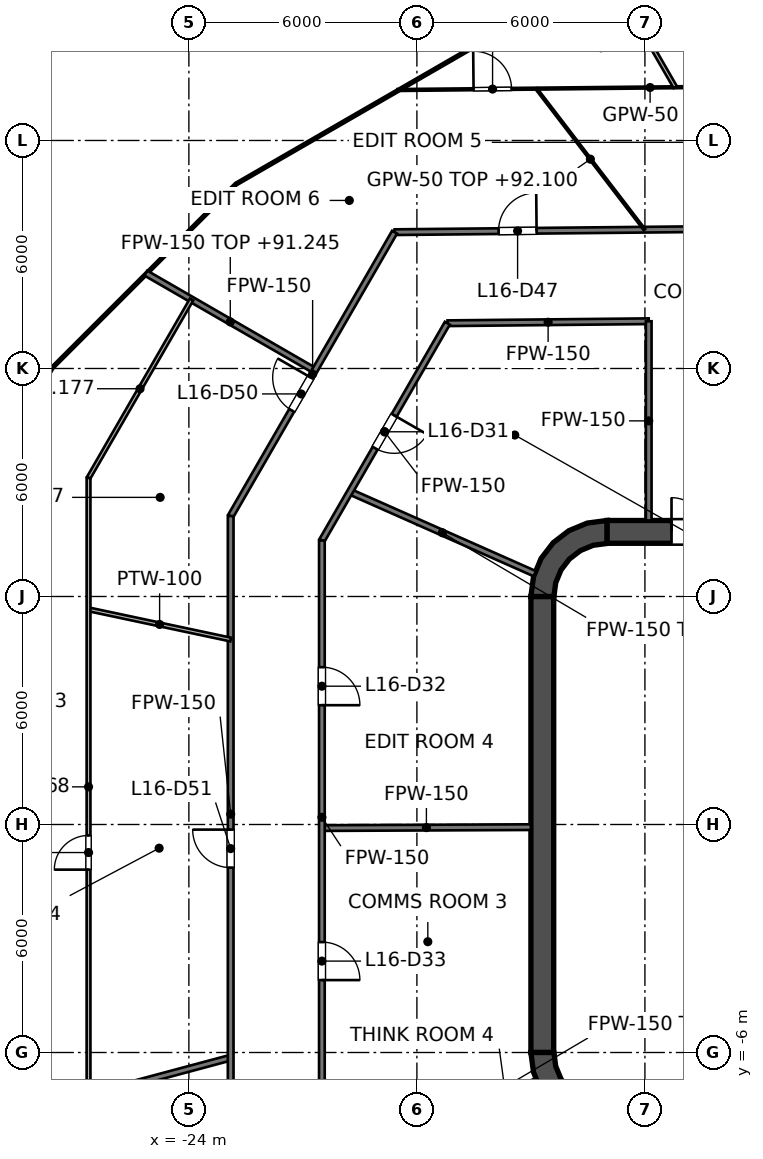
"""IFC4 building model, lengths in metres.
Left out: names, types, materials, properties, quantities, classifications, styles, units other than length and angle.
Written with IfcOpenShell. Run it as: python <this file> out.ifc"""

import sys

from ifc_helpers import new_model, si_unit, direction, frame, frame_2d, origin, place, context, subcontext, project, spatial, polyline, rectangle, outline, extrude, element, fill, save


model = new_model("IFC4")
c1 = context("Model", 3, precision=1e-05, world=origin(), true_north=direction((0.0, 1.0)))
c2 = subcontext(c1, "Body", "Model", "MODEL_VIEW")
j1 = project(units=[si_unit("LENGTHUNIT", "METRE"), si_unit("PLANEANGLEUNIT", "RADIAN")], contexts=[c1])
p1 = place(None, origin())
s1 = spatial("IfcSite", under=j1, at=p1, CompositionType="ELEMENT")
p2 = place(p1, origin())
s2 = spatial("IfcBuilding", under=s1, at=p2, CompositionType="ELEMENT")
p3 = place(p2, frame((0.0, 0.0, 88.2)))
s3 = spatial("IfcBuildingStorey", under=s2, at=p3, CompositionType="ELEMENT", Elevation=88.2)
p4 = place(p3, frame((-13.0, 7.7, 0.0), z_axis=(0.0, 0.0, 1.0), x_axis=(1.0, 0.0, 0.0)))
e1 = element("IfcWall", 1, at=p4, inside=s3, PredefinedType="SHEAR", context=c2, shape_type="SweptSolid", body=[
    extrude(rectangle(XDim=26.0, YDim=0.6, at=frame_2d((13.0, 0.0))), origin(), (0.0, 0.0, 1.0), 4.2),
])
p5 = place(p4, frame((1.7, 0.0, 0.0)))
e2 = element("IfcOpeningElement", 2, at=p5, cuts=e1, PredefinedType="OPENING", context=c2, shape_type="SweptSolid", body=[
    extrude(rectangle(XDim=1.8, YDim=2.1, at=frame_2d((0.9, 1.05))), frame((0.0, 0.3, 0.0), z_axis=(0.0, -1.0, 0.0), x_axis=(1.0, 0.0, 0.0)), (0.0, 0.0, 1.0), 0.6),
])
p6 = place(p4, frame((22.5, 0.0, 0.0)))
e3 = element("IfcOpeningElement", 3, at=p6, cuts=e1, PredefinedType="OPENING", context=c2, shape_type="SweptSolid", body=[
    extrude(rectangle(XDim=1.8, YDim=2.1, at=frame_2d((0.9, 1.05))), frame((0.0, 0.3, 0.0), z_axis=(0.0, -1.0, 0.0), x_axis=(1.0, 0.0, 0.0)), (0.0, 0.0, 1.0), 0.6),
])
p7 = place(p3, frame((-14.7, -6.0, 0.0), z_axis=(0.0, 0.0, 1.0), x_axis=(0.0, 1.0, 0.0)))
e4 = element("IfcWall", 4, at=p7, inside=s3, PredefinedType="SHEAR", context=c2, shape_type="SweptSolid", body=[
    extrude(rectangle(XDim=12.0, YDim=0.6, at=frame_2d((6.0, 0.0))), origin(), (0.0, 0.0, 1.0), 4.2),
])
p8 = place(p3, origin())
e5 = element("IfcWall", 5, at=p8, inside=s3, PredefinedType="SHEAR", context=c2, shape_type="SweptSolid", body=[
    extrude(outline(polyline([(-15.0, 6.0), (-14.395, 6.0), (-14.347, 6.361), (-14.208, 6.698), (-13.986, 6.986), (-13.698, 7.208), (-13.361, 7.347), (-13.0, 7.395), (-13.0, 8.0), (-13.518, 7.932), (-14.0, 7.732), (-14.414, 7.414), (-14.732, 7.0), (-14.932, 6.518), (-15.0, 6.0)])), origin(), (0.0, 0.0, 1.0), 4.2),
])
e6 = element("IfcWall", 6, at=p8, inside=s3, PredefinedType="SHEAR", context=c2, shape_type="SweptSolid", body=[
    extrude(outline(polyline([(-13.0, -8.0), (-13.0, -7.395), (-13.361, -7.347), (-13.698, -7.208), (-13.986, -6.986), (-14.208, -6.698), (-14.347, -6.361), (-14.395, -6.0), (-15.0, -6.0), (-14.932, -6.518), (-14.732, -7.0), (-14.414, -7.414), (-14.0, -7.732), (-13.518, -7.932), (-13.0, -8.0)])), origin(), (0.0, 0.0, 1.0), 4.2),
])
p9 = place(p3, frame((-11.8, -7.4, 0.0), z_axis=(0.0, 0.0, 1.0), x_axis=(0.0, 1.0, 0.0)))
e7 = element("IfcWall", 7, at=p9, inside=s3, PredefinedType="SOLIDWALL", context=c2, shape_type="SweptSolid", body=[
    extrude(rectangle(XDim=14.8, YDim=0.4, at=frame_2d((7.4, 0.0))), origin(), (0.0, 0.0, 1.0), 4.05),
])
p10 = place(p9, frame((11.2, 0.0, 0.0)))
e8 = element("IfcOpeningElement", 8, at=p10, cuts=e7, PredefinedType="OPENING", context=c2, shape_type="SweptSolid", body=[
    extrude(rectangle(XDim=1.1, YDim=2.1, at=frame_2d((0.55, 1.05))), frame((0.0, 0.2, 0.0), z_axis=(0.0, -1.0, 0.0), x_axis=(1.0, 0.0, 0.0)), (0.0, 0.0, 1.0), 0.4),
])
p11 = place(p9, frame((8.3, 0.0, 0.0)))
e9 = element("IfcOpeningElement", 9, at=p11, cuts=e7, PredefinedType="OPENING", context=c2, shape_type="SweptSolid", body=[
    extrude(rectangle(XDim=1.1, YDim=2.1, at=frame_2d((0.55, 1.05))), frame((0.0, 0.2, 0.0), z_axis=(0.0, -1.0, 0.0), x_axis=(1.0, 0.0, 0.0)), (0.0, 0.0, 1.0), 0.4),
])
p12 = place(p9, frame((5.4, 0.0, 0.0)))
e10 = element("IfcOpeningElement", 10, at=p12, cuts=e7, PredefinedType="OPENING", context=c2, shape_type="SweptSolid", body=[
    extrude(rectangle(XDim=1.1, YDim=2.1, at=frame_2d((0.55, 1.05))), frame((0.0, 0.2, 0.0), z_axis=(0.0, -1.0, 0.0), x_axis=(1.0, 0.0, 0.0)), (0.0, 0.0, 1.0), 0.4),
])
p13 = place(p9, frame((13.552, 0.0, 0.0)))
e11 = element("IfcOpeningElement", 11, at=p13, cuts=e7, PredefinedType="OPENING", context=c2, shape_type="SweptSolid", body=[
    extrude(rectangle(XDim=0.9, YDim=2.1, at=frame_2d((0.45, 1.05))), frame((0.0, 0.2, 0.0), z_axis=(0.0, -1.0, 0.0), x_axis=(1.0, 0.0, 0.0)), (0.0, 0.0, 1.0), 0.4),
])
p14 = place(p9, frame((0.347, 0.0, 0.0)))
e12 = element("IfcOpeningElement", 12, at=p14, cuts=e7, PredefinedType="OPENING", context=c2, shape_type="SweptSolid", body=[
    extrude(rectangle(XDim=0.9, YDim=2.1, at=frame_2d((0.45, 1.05))), frame((0.0, 0.2, 0.0), z_axis=(0.0, -1.0, 0.0), x_axis=(1.0, 0.0, 0.0)), (0.0, 0.0, 1.0), 0.4),
])
e13 = element("IfcWall", 13, at=p8, inside=s3, PredefinedType="SOLIDWALL", context=c2, shape_type="SweptSolid", body=[
    extrude(outline(polyline([(-12.0, -5.925), (-12.0, -5.675), (-14.15, -5.675), (-14.15, -3.025), (-12.0, -3.025), (-12.0, -2.775), (-14.15, -2.775), (-14.15, -0.125), (-12.0, -0.125), (-12.0, 0.125), (-14.15, 0.125), (-14.15, 2.775), (-12.0, 2.775), (-12.0, 3.025), (-14.15, 3.025), (-14.15, 5.675), (-12.0, 5.675), (-12.0, 5.925), (-14.15, 5.925), (-14.4, 5.925), (-14.4, 5.675), (-14.4, 3.025), (-14.4, 2.775), (-14.4, 0.125), (-14.4, -0.125), (-14.4, -2.775), (-14.4, -3.025), (-14.4, -5.675), (-14.4, -5.925), (-14.15, -5.925), (-12.0, -5.925)])), origin(), (0.0, 0.0, 1.0), 4.05),
])
p15 = place(p3, frame((-25.131, 14.509, 0.0), z_axis=(0.0, 0.0, 1.0), x_axis=(0.866037334331, -0.499979335118, 0.0)))
e14 = element("IfcWall", 14, at=p15, inside=s3, PredefinedType="PARTITIONING", context=c2, shape_type="SweptSolid", body=[
    extrude(rectangle(XDim=5.128, YDim=0.15, at=frame_2d((2.564, 0.0))), origin(), (0.0, 0.0, 1.0), 3.045),
])
p16 = place(p3, frame((-19.76, 8.755, 0.0), z_axis=(0.0, 0.0, 1.0), x_axis=(0.91424834547, -0.405154245695, 0.0)))
e15 = element("IfcWall", 15, at=p16, inside=s3, PredefinedType="PARTITIONING", context=c2, shape_type="SweptSolid", body=[
    extrude(rectangle(XDim=5.318, YDim=0.15, at=frame_2d((2.659, 0.0))), origin(), (0.0, 0.0, 1.0), 2.977),
])
p17 = place(p3, frame((-20.5, -0.094, 0.0), z_axis=(0.0, 0.0, 1.0), x_axis=(0.999990148138, 0.004438876723, 0.0)))
e16 = element("IfcWall", 16, at=p17, inside=s3, PredefinedType="PARTITIONING", context=c2, shape_type="SweptSolid", body=[
    extrude(rectangle(XDim=5.5, YDim=0.15, at=frame_2d((2.75, 0.0))), origin(), (0.0, 0.0, 1.0), 2.968),
])
p18 = place(p3, frame((-17.194, 13.191, 0.0), z_axis=(0.0, 0.0, 1.0), x_axis=(0.999950853109, 0.009914200296, 0.0)))
e17 = element("IfcWall", 17, at=p18, inside=s3, PredefinedType="PARTITIONING", context=c2, shape_type="SweptSolid", body=[
    extrude(rectangle(XDim=5.294, YDim=0.15, at=frame_2d((2.647, 0.0))), origin(), (0.0, 0.0, 1.0), 2.968),
])
p19 = place(p3, frame((-18.587, 15.587, 0.0), z_axis=(0.0, 0.0, 1.0), x_axis=(0.99995087003, 0.009912493396, 0.0)))
e18 = element("IfcWall", 18, at=p19, inside=s3, PredefinedType="PARTITIONING", context=c2, shape_type="SweptSolid", body=[
    extrude(rectangle(XDim=33.669, YDim=0.15, at=frame_2d((16.834, 0.0))), origin(), (0.0, 0.0, 1.0), 2.968),
])
p20 = place(p19, frame((21.034, 0.0, 0.0)))
e19 = element("IfcOpeningElement", 19, at=p20, cuts=e18, PredefinedType="OPENING", context=c2, shape_type="SweptSolid", body=[
    extrude(rectangle(XDim=1.0, YDim=2.1, at=frame_2d((0.5, 1.05))), frame((0.0, 0.075, 0.0), z_axis=(0.0, -1.0, 0.0), x_axis=(1.0, 0.0, 0.0)), (0.0, 0.0, 1.0), 0.15),
])
p21 = place(p19, frame((17.73, 0.0, 0.0)))
e20 = element("IfcOpeningElement", 20, at=p21, cuts=e18, PredefinedType="OPENING", context=c2, shape_type="SweptSolid", body=[
    extrude(rectangle(XDim=1.0, YDim=2.1, at=frame_2d((0.5, 1.05))), frame((0.0, 0.075, 0.0), z_axis=(0.0, -1.0, 0.0), x_axis=(1.0, 0.0, 0.0)), (0.0, 0.0, 1.0), 0.15),
])
p22 = place(p19, frame((15.077, 0.0, 0.0)))
e21 = element("IfcOpeningElement", 21, at=p22, cuts=e18, PredefinedType="OPENING", context=c2, shape_type="SweptSolid", body=[
    extrude(rectangle(XDim=1.0, YDim=2.1, at=frame_2d((0.5, 1.05))), frame((0.0, 0.075, 0.0), z_axis=(0.0, -1.0, 0.0), x_axis=(1.0, 0.0, 0.0)), (0.0, 0.0, 1.0), 0.15),
])
p23 = place(p19, frame((10.026, 0.0, 0.0)))
e22 = element("IfcOpeningElement", 22, at=p23, cuts=e18, PredefinedType="OPENING", context=c2, shape_type="SweptSolid", body=[
    extrude(rectangle(XDim=1.0, YDim=2.1, at=frame_2d((0.5, 1.05))), frame((0.0, 0.075, 0.0), z_axis=(0.0, -1.0, 0.0), x_axis=(1.0, 0.0, 0.0)), (0.0, 0.0, 1.0), 0.15),
])
p24 = place(p19, frame((2.737, 0.0, 0.0)))
e23 = element("IfcOpeningElement", 23, at=p24, cuts=e18, PredefinedType="OPENING", context=c2, shape_type="SweptSolid", body=[
    extrude(rectangle(XDim=1.0, YDim=2.1, at=frame_2d((0.5, 1.05))), frame((0.0, 0.075, 0.0), z_axis=(0.0, -1.0, 0.0), x_axis=(1.0, 0.0, 0.0)), (0.0, 0.0, 1.0), 0.15),
])
p25 = place(p3, frame((-29.928, -8.019, 0.0), z_axis=(0.0, 0.0, 1.0), x_axis=(0.965929629594, 0.258804850559, 0.0)))
e24 = element("IfcWall", 24, at=p25, inside=s3, PredefinedType="PARTITIONING", context=c2, shape_type="SweptSolid", body=[
    extrude(rectangle(XDim=7.276, YDim=0.15, at=frame_2d((3.638, 0.0))), origin(), (0.0, 0.0, 1.0), 3.727),
])
p26 = place(p3, frame((-19.728, -8.958, 0.0), z_axis=(0.0, 0.0, 1.0), x_axis=(0.910629511797, 0.413223779863, 0.0)))
e25 = element("IfcWall", 25, at=p26, inside=s3, PredefinedType="PARTITIONING", context=c2, shape_type="SweptSolid", body=[
    extrude(rectangle(XDim=5.368, YDim=0.15, at=frame_2d((2.684, 0.0))), origin(), (0.0, 0.0, 1.0), 3.9),
])
p27 = place(p3, frame((-20.5, 7.474, 0.0), z_axis=(0.0, 0.0, 1.0), x_axis=(0.500012665616, 0.866018091164, 0.0)))
e26 = element("IfcWall", 26, at=p27, inside=s3, PredefinedType="PARTITIONING", context=c2, shape_type="SweptSolid", body=[
    extrude(rectangle(XDim=6.602, YDim=0.15, at=frame_2d((3.301, 0.0))), origin(), (0.0, 0.0, 1.0), 2.968),
])
p28 = place(p27, frame((2.803, 0.0, 0.0)))
e27 = element("IfcOpeningElement", 27, at=p28, cuts=e26, PredefinedType="OPENING", context=c2, shape_type="SweptSolid", body=[
    extrude(rectangle(XDim=1.0, YDim=2.1, at=frame_2d((0.5, 1.05))), frame((0.0, 0.075, 0.0), z_axis=(0.0, -1.0, 0.0), x_axis=(1.0, 0.0, 0.0)), (0.0, 0.0, 1.0), 0.15),
])
p29 = place(p3, frame((-22.9, 8.117, 0.0), z_axis=(0.0, 0.0, 1.0), x_axis=(0.5000050195, 0.866022505755, 0.0)))
e28 = element("IfcWall", 28, at=p29, inside=s3, PredefinedType="PARTITIONING", context=c2, shape_type="SweptSolid", body=[
    extrude(rectangle(XDim=8.626, YDim=0.15, at=frame_2d((4.313, 0.0))), origin(), (0.0, 0.0, 1.0), 2.968),
])
p30 = place(p29, frame((3.211, 0.0, 0.0)))
e29 = element("IfcOpeningElement", 29, at=p30, cuts=e28, PredefinedType="OPENING", context=c2, shape_type="SweptSolid", body=[
    extrude(rectangle(XDim=1.0, YDim=2.1, at=frame_2d((0.5, 1.05))), frame((0.0, 0.075, 0.0), z_axis=(0.0, -1.0, 0.0), x_axis=(1.0, 0.0, 0.0)), (0.0, 0.0, 1.0), 0.15),
])
p31 = place(p3, frame((-11.9, 8.0, 0.0), z_axis=(0.0, 0.0, 1.0), x_axis=(0.0, 1.0, 0.0)))
e30 = element("IfcWall", 30, at=p31, inside=s3, PredefinedType="PARTITIONING", context=c2, shape_type="SweptSolid", body=[
    extrude(rectangle(XDim=5.243, YDim=0.15, at=frame_2d((2.622, 0.0))), origin(), (0.0, 0.0, 1.0), 2.968),
])
p32 = place(p3, frame((-20.5, -7.095, 0.0), z_axis=(0.0, 0.0, 1.0), x_axis=(0.0, 1.0, 0.0)))
e31 = element("IfcWall", 31, at=p32, inside=s3, PredefinedType="PARTITIONING", context=c2, shape_type="SweptSolid", body=[
    extrude(rectangle(XDim=14.569, YDim=0.15, at=frame_2d((7.285, 0.0))), origin(), (0.0, 0.0, 1.0), 2.968),
])
p33 = place(p32, frame((10.234, 0.0, 0.0)))
e32 = element("IfcOpeningElement", 32, at=p33, cuts=e31, PredefinedType="OPENING", context=c2, shape_type="SweptSolid", body=[
    extrude(rectangle(XDim=1.0, YDim=2.1, at=frame_2d((0.5, 1.05))), frame((0.0, 0.075, 0.0), z_axis=(0.0, -1.0, 0.0), x_axis=(1.0, 0.0, 0.0)), (0.0, 0.0, 1.0), 0.15),
])
p34 = place(p32, frame((3.0, 0.0, 0.0)))
e33 = element("IfcOpeningElement", 33, at=p34, cuts=e31, PredefinedType="OPENING", context=c2, shape_type="SweptSolid", body=[
    extrude(rectangle(XDim=1.0, YDim=2.1, at=frame_2d((0.5, 1.05))), frame((0.0, 0.075, 0.0), z_axis=(0.0, -1.0, 0.0), x_axis=(1.0, 0.0, 0.0)), (0.0, 0.0, 1.0), 0.15),
])
p35 = place(p3, frame((-22.9, -7.572, 0.0), z_axis=(0.0, 0.0, 1.0), x_axis=(0.0, 1.0, 0.0)))
e34 = element("IfcWall", 34, at=p35, inside=s3, PredefinedType="PARTITIONING", context=c2, shape_type="SweptSolid", body=[
    extrude(rectangle(XDim=15.689, YDim=0.15, at=frame_2d((7.844, 0.0))), origin(), (0.0, 0.0, 1.0), 2.968),
])
p36 = place(p35, frame((6.438, 0.0, 0.0)))
e35 = element("IfcOpeningElement", 35, at=p36, cuts=e34, PredefinedType="OPENING", context=c2, shape_type="SweptSolid", body=[
    extrude(rectangle(XDim=1.0, YDim=2.1, at=frame_2d((0.5, 1.05))), frame((0.0, 0.075, 0.0), z_axis=(0.0, -1.0, 0.0), x_axis=(1.0, 0.0, 0.0)), (0.0, 0.0, 1.0), 0.15),
])
p37 = place(p3, frame((-14.859, 19.364, 0.0), z_axis=(0.0, 0.0, 1.0), x_axis=(0.608714147517, -0.793389618418, 0.0)))
e36 = element("IfcWall", 36, at=p37, inside=s3, PredefinedType="PARTITIONING", context=c2, shape_type="SweptSolid", body=[
    extrude(rectangle(XDim=4.678, YDim=0.05, at=frame_2d((2.339, 0.0))), origin(), (0.0, 0.0, 1.0), 3.9),
])
p38 = place(p3, frame((-18.512, 19.328, 0.0), z_axis=(0.0, 0.0, 1.0), x_axis=(0.999950851933, 0.009914318817, 0.0)))
e37 = element("IfcWall", 37, at=p38, inside=s3, PredefinedType="PARTITIONING", context=c2, shape_type="SweptSolid", body=[
    extrude(rectangle(XDim=13.298, YDim=0.05, at=frame_2d((6.649, 0.0))), origin(), (0.0, 0.0, 1.0), 2.968),
])
p39 = place(p38, frame((7.975, 0.0, 0.0)))
e38 = element("IfcOpeningElement", 38, at=p39, cuts=e37, PredefinedType="OPENING", context=c2, shape_type="SweptSolid", body=[
    extrude(rectangle(XDim=1.0, YDim=2.1, at=frame_2d((0.5, 1.05))), frame((0.0, 0.025, 0.0), z_axis=(0.0, -1.0, 0.0), x_axis=(1.0, 0.0, 0.0)), (0.0, 0.0, 1.0), 0.05),
])
p40 = place(p38, frame((2.003, 0.0, 0.0)))
e39 = element("IfcOpeningElement", 39, at=p40, cuts=e37, PredefinedType="OPENING", context=c2, shape_type="SweptSolid", body=[
    extrude(rectangle(XDim=1.0, YDim=2.1, at=frame_2d((0.5, 1.05))), frame((0.0, 0.025, 0.0), z_axis=(0.0, -1.0, 0.0), x_axis=(1.0, 0.0, 0.0)), (0.0, 0.0, 1.0), 0.05),
])
p41 = place(p3, frame((-12.629, 21.874, 0.0), z_axis=(0.0, 0.0, 1.0), x_axis=(0.500028324968, -0.866009049739, 0.0)))
e40 = element("IfcWall", 40, at=p41, inside=s3, PredefinedType="PARTITIONING", context=c2, shape_type="SweptSolid", body=[
    extrude(rectangle(XDim=2.856, YDim=0.1, at=frame_2d((1.428, 0.0))), origin(), (0.0, 0.0, 1.0), 3.502),
])
p42 = place(p3, frame((-26.64, 5.662, 0.0), z_axis=(0.0, 0.0, 1.0), x_axis=(0.978136613381, -0.207963375533, 0.0)))
e41 = element("IfcWall", 41, at=p42, inside=s3, PredefinedType="PARTITIONING", context=c2, shape_type="SweptSolid", body=[
    extrude(rectangle(XDim=3.823, YDim=0.1, at=frame_2d((1.912, 0.0))), origin(), (0.0, 0.0, 1.0), 3.9),
])
p43 = place(p3, frame((-26.64, 9.119, 0.0), z_axis=(0.0, 0.0, 1.0), x_axis=(0.499955005135, 0.866051380023, 0.0)))
e42 = element("IfcWall", 42, at=p43, inside=s3, PredefinedType="PARTITIONING", context=c2, shape_type="SweptSolid", body=[
    extrude(rectangle(XDim=5.422, YDim=0.1, at=frame_2d((2.711, 0.0))), origin(), (0.0, 0.0, 1.0), 2.977),
])
p44 = place(p3, frame((-26.64, -7.138, 0.0), z_axis=(0.0, 0.0, 1.0), x_axis=(0.0, 1.0, 0.0)))
e43 = element("IfcWall", 43, at=p44, inside=s3, PredefinedType="PARTITIONING", context=c2, shape_type="SweptSolid", body=[
    extrude(rectangle(XDim=16.257, YDim=0.1, at=frame_2d((8.128, 0.0))), origin(), (0.0, 0.0, 1.0), 2.968),
])
p45 = place(p44, frame((5.95, 0.0, 0.0)))
e44 = element("IfcOpeningElement", 44, at=p45, cuts=e43, PredefinedType="OPENING", context=c2, shape_type="SweptSolid", body=[
    extrude(rectangle(XDim=0.9, YDim=2.1, at=frame_2d((0.45, 1.05))), frame((0.0, 0.05, 0.0), z_axis=(0.0, -1.0, 0.0), x_axis=(1.0, 0.0, 0.0)), (0.0, 0.0, 1.0), 0.1),
])
p46 = place(p10, origin())
e45 = element("IfcDoor", 45, at=p46, inside=s3, OperationType="DOUBLE_DOOR_SLIDING", PredefinedType="DOOR", context=c2, shape_type="SweptSolid", body=[
    extrude(rectangle(XDim=1.1, YDim=2.1, at=frame_2d((0.55, 1.05))), frame((0.0, 0.025, 0.0), z_axis=(0.0, -1.0, 0.0), x_axis=(1.0, 0.0, 0.0)), (0.0, 0.0, 1.0), 0.05),
])
fill(e8, e45)
p47 = place(p11, origin())
e46 = element("IfcDoor", 46, at=p47, inside=s3, OperationType="DOUBLE_DOOR_SLIDING", PredefinedType="DOOR", context=c2, shape_type="SweptSolid", body=[
    extrude(rectangle(XDim=1.1, YDim=2.1, at=frame_2d((0.55, 1.05))), frame((0.0, 0.025, 0.0), z_axis=(0.0, -1.0, 0.0), x_axis=(1.0, 0.0, 0.0)), (0.0, 0.0, 1.0), 0.05),
])
fill(e9, e46)
p48 = place(p12, origin())
e47 = element("IfcDoor", 47, at=p48, inside=s3, OperationType="DOUBLE_DOOR_SLIDING", PredefinedType="DOOR", context=c2, shape_type="SweptSolid", body=[
    extrude(rectangle(XDim=1.1, YDim=2.1, at=frame_2d((0.55, 1.05))), frame((0.0, 0.025, 0.0), z_axis=(0.0, -1.0, 0.0), x_axis=(1.0, 0.0, 0.0)), (0.0, 0.0, 1.0), 0.05),
])
fill(e10, e47)
p49 = place(p13, origin())
e48 = element("IfcDoor", 48, at=p49, inside=s3, OperationType="SINGLE_SWING_LEFT", PredefinedType="DOOR", context=c2, shape_type="SweptSolid", body=[
    extrude(rectangle(XDim=0.9, YDim=2.1, at=frame_2d((0.45, 1.05))), frame((0.0, 0.025, 0.0), z_axis=(0.0, -1.0, 0.0), x_axis=(1.0, 0.0, 0.0)), (0.0, 0.0, 1.0), 0.05),
])
fill(e11, e48)
p50 = place(p14, origin())
e49 = element("IfcDoor", 49, at=p50, inside=s3, OperationType="SINGLE_SWING_LEFT", PredefinedType="DOOR", context=c2, shape_type="SweptSolid", body=[
    extrude(rectangle(XDim=0.9, YDim=2.1, at=frame_2d((0.45, 1.05))), frame((0.0, 0.025, 0.0), z_axis=(0.0, -1.0, 0.0), x_axis=(1.0, 0.0, 0.0)), (0.0, 0.0, 1.0), 0.05),
])
fill(e12, e49)
p51 = place(p5, origin())
e50 = element("IfcDoor", 50, at=p51, inside=s3, OperationType="DOUBLE_DOOR_SINGLE_SWING", PredefinedType="DOOR", context=c2, shape_type="SweptSolid", body=[
    extrude(rectangle(XDim=1.8, YDim=2.1, at=frame_2d((0.9, 1.05))), frame((0.0, 0.025, 0.0), z_axis=(0.0, -1.0, 0.0), x_axis=(1.0, 0.0, 0.0)), (0.0, 0.0, 1.0), 0.05),
])
fill(e2, e50)
p52 = place(p28, origin())
e51 = element("IfcDoor", 51, at=p52, inside=s3, OperationType="SINGLE_SWING_RIGHT", PredefinedType="DOOR", context=c2, shape_type="SweptSolid", body=[
    extrude(rectangle(XDim=1.0, YDim=2.1, at=frame_2d((0.5, 1.05))), frame((0.0, 0.025, 0.0), z_axis=(0.0, -1.0, 0.0), x_axis=(1.0, 0.0, 0.0)), (0.0, 0.0, 1.0), 0.05),
])
fill(e27, e51)
p53 = place(p33, origin())
e52 = element("IfcDoor", 52, at=p53, inside=s3, OperationType="SINGLE_SWING_LEFT", PredefinedType="DOOR", context=c2, shape_type="SweptSolid", body=[
    extrude(rectangle(XDim=1.0, YDim=2.1, at=frame_2d((0.5, 1.05))), frame((0.0, 0.025, 0.0), z_axis=(0.0, -1.0, 0.0), x_axis=(1.0, 0.0, 0.0)), (0.0, 0.0, 1.0), 0.05),
])
fill(e32, e52)
p54 = place(p34, origin())
e53 = element("IfcDoor", 53, at=p54, inside=s3, OperationType="SINGLE_SWING_LEFT", PredefinedType="DOOR", context=c2, shape_type="SweptSolid", body=[
    extrude(rectangle(XDim=1.0, YDim=2.1, at=frame_2d((0.5, 1.05))), frame((0.0, 0.025, 0.0), z_axis=(0.0, -1.0, 0.0), x_axis=(1.0, 0.0, 0.0)), (0.0, 0.0, 1.0), 0.05),
])
fill(e33, e53)
p55 = place(p24, origin())
e54 = element("IfcDoor", 54, at=p55, inside=s3, OperationType="SINGLE_SWING_RIGHT", PredefinedType="DOOR", context=c2, shape_type="SweptSolid", body=[
    extrude(rectangle(XDim=1.0, YDim=2.1, at=frame_2d((0.5, 1.05))), frame((0.0, 0.025, 0.0), z_axis=(0.0, -1.0, 0.0), x_axis=(1.0, 0.0, 0.0)), (0.0, 0.0, 1.0), 0.05),
])
fill(e23, e54)
p56 = place(p40, origin())
e55 = element("IfcDoor", 55, at=p56, inside=s3, OperationType="SINGLE_SWING_LEFT", PredefinedType="DOOR", context=c2, shape_type="SweptSolid", body=[
    extrude(rectangle(XDim=1.0, YDim=2.1, at=frame_2d((0.5, 1.05))), frame((0.0, 0.025, 0.0), z_axis=(0.0, -1.0, 0.0), x_axis=(1.0, 0.0, 0.0)), (0.0, 0.0, 1.0), 0.05),
])
fill(e39, e55)
p57 = place(p30, origin())
e56 = element("IfcDoor", 56, at=p57, inside=s3, OperationType="SINGLE_SWING_RIGHT", PredefinedType="DOOR", context=c2, shape_type="SweptSolid", body=[
    extrude(rectangle(XDim=1.0, YDim=2.1, at=frame_2d((0.5, 1.05))), frame((0.0, 0.025, 0.0), z_axis=(0.0, -1.0, 0.0), x_axis=(1.0, 0.0, 0.0)), (0.0, 0.0, 1.0), 0.05),
])
fill(e29, e56)
p58 = place(p36, origin())
e57 = element("IfcDoor", 57, at=p58, inside=s3, OperationType="SINGLE_SWING_RIGHT", PredefinedType="DOOR", context=c2, shape_type="SweptSolid", body=[
    extrude(rectangle(XDim=1.0, YDim=2.1, at=frame_2d((0.5, 1.05))), frame((0.0, 0.025, 0.0), z_axis=(0.0, -1.0, 0.0), x_axis=(1.0, 0.0, 0.0)), (0.0, 0.0, 1.0), 0.05),
])
fill(e35, e57)
p59 = place(p45, origin())
e58 = element("IfcDoor", 58, at=p59, inside=s3, OperationType="SINGLE_SWING_LEFT", PredefinedType="DOOR", context=c2, shape_type="SweptSolid", body=[
    extrude(rectangle(XDim=0.9, YDim=2.1, at=frame_2d((0.45, 1.05))), frame((0.0, 0.025, 0.0), z_axis=(0.0, -1.0, 0.0), x_axis=(1.0, 0.0, 0.0)), (0.0, 0.0, 1.0), 0.05),
])
fill(e44, e58)
save(model, sys.argv[1])
